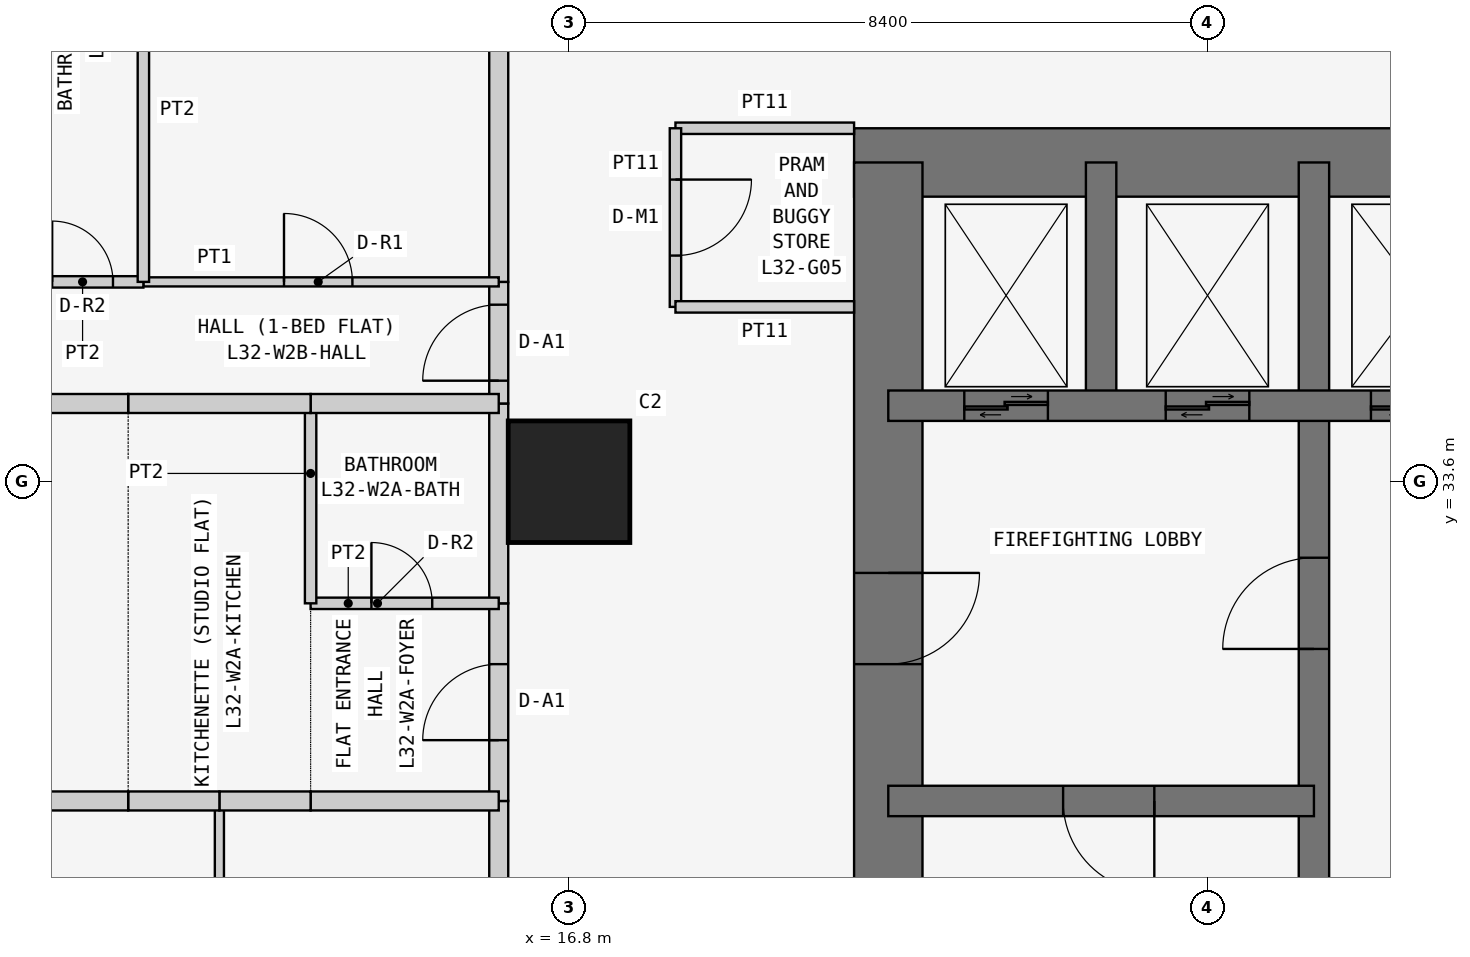
"""IFC4 building model, lengths in metres.
Left out: names, types, materials, properties, quantities, classifications, styles, units other than length and angle.
Written with IfcOpenShell. Run it as: python <this file> out.ifc"""

import sys

from ifc_helpers import new_model, si_unit, direction, frame, frame_2d, origin, origin_2d, place, context, subcontext, project, spatial, rectangle, extrude, element, fill, save


model = new_model("IFC4")
c1 = context("Model", 3, precision=1e-05, world=origin(), true_north=direction((0.0, 1.0)))
c2 = subcontext(c1, "Body", "Model", "MODEL_VIEW")
j1 = project(units=[si_unit("LENGTHUNIT", "METRE"), si_unit("PLANEANGLEUNIT", "RADIAN")], contexts=[c1])
p1 = place(None, origin())
s1 = spatial("IfcSite", under=j1, at=p1, CompositionType="ELEMENT")
p2 = place(p1, origin())
s2 = spatial("IfcBuilding", under=s1, at=p2, CompositionType="ELEMENT")
p3 = place(p2, frame((0.0, 0.0, 126.9)))
s3 = spatial("IfcBuildingStorey", under=s2, at=p3, CompositionType="ELEMENT", Elevation=126.9)
p4 = place(p3, frame((16.8, 33.6, 0.0), z_axis=(0.0, 0.0, 1.0), x_axis=(1.0, 0.0, 0.0)))
e1 = element("IfcColumn", 1, at=p4, inside=s3, PredefinedType="COLUMN", context=c2, shape_type="SweptSolid", body=[
    extrude(rectangle(XDim=1.6, YDim=1.6, at=origin_2d()), origin(), (0.0, 0.0, 1.0), 3.6),
])
p5 = place(p3, frame((37.8, 37.8, 0.0), z_axis=(0.0, 0.0, 1.0), x_axis=(-1.0, 0.0, 0.0)))
e2 = element("IfcWall", 2, at=p5, inside=s3, PredefinedType="SHEAR", context=c2, shape_type="SweptSolid", body=[
    extrude(rectangle(XDim=17.25, YDim=0.9, at=frame_2d((8.625, 0.0))), origin(), (0.0, 0.0, 1.0), 3.6),
])
p6 = place(p3, frame((21.0, 37.8, 0.0), z_axis=(0.0, 0.0, 1.0), x_axis=(0.0, -1.0, 0.0)))
e3 = element("IfcWall", 3, at=p6, inside=s3, PredefinedType="SHEAR", context=c2, shape_type="SweptSolid", body=[
    extrude(rectangle(XDim=17.25, YDim=0.9, at=frame_2d((8.625, 0.0))), origin(), (0.0, 0.0, 1.0), 3.6),
])
p7 = place(p6, frame((5.4, 0.0, 0.0)))
e4 = element("IfcOpeningElement", 4, at=p7, cuts=e3, PredefinedType="OPENING", context=c2, shape_type="SweptSolid", body=[
    extrude(rectangle(XDim=1.2, YDim=2.1, at=frame_2d((0.6, 1.05))), frame((0.0, 0.46, 0.0), z_axis=(0.0, -1.0, 0.0), x_axis=(1.0, 0.0, 0.0)), (0.0, 0.0, 1.0), 0.92),
])
p8 = place(p3, frame((26.6, 21.0, 0.0), z_axis=(0.0, 0.0, 1.0), x_axis=(0.0, 1.0, 0.0)))
e5 = element("IfcWall", 5, at=p8, inside=s3, PredefinedType="SHEAR", context=c2, shape_type="SweptSolid", body=[
    extrude(rectangle(XDim=16.8, YDim=0.4, at=frame_2d((8.4, 0.0))), origin(), (0.0, 0.0, 1.0), 3.6),
])
p9 = place(p8, frame((10.4, 0.0, 0.0)))
e6 = element("IfcOpeningElement", 6, at=p9, cuts=e5, PredefinedType="OPENING", context=c2, shape_type="SweptSolid", body=[
    extrude(rectangle(XDim=1.2, YDim=2.1, at=frame_2d((0.6, 1.05))), frame((0.0, 0.21, 0.0), z_axis=(0.0, -1.0, 0.0), x_axis=(1.0, 0.0, 0.0)), (0.0, 0.0, 1.0), 0.42),
])
p10 = place(p3, frame((21.0, 29.4, 0.0), z_axis=(0.0, 0.0, 1.0), x_axis=(1.0, 0.0, 0.0)))
e7 = element("IfcWall", 7, at=p10, inside=s3, PredefinedType="SHEAR", context=c2, shape_type="SweptSolid", body=[
    extrude(rectangle(XDim=5.6, YDim=0.4, at=frame_2d((2.8, 0.0))), origin(), (0.0, 0.0, 1.0), 3.6),
])
p11 = place(p10, frame((2.3, 0.0, 0.0)))
e8 = element("IfcOpeningElement", 8, at=p11, cuts=e7, PredefinedType="OPENING", context=c2, shape_type="SweptSolid", body=[
    extrude(rectangle(XDim=1.2, YDim=2.1, at=frame_2d((0.6, 1.05))), frame((0.0, 0.21, 0.0), z_axis=(0.0, -1.0, 0.0), x_axis=(1.0, 0.0, 0.0)), (0.0, 0.0, 1.0), 0.42),
])
p12 = place(p3, frame((21.0, 34.6, 0.0), z_axis=(0.0, 0.0, 1.0), x_axis=(1.0, 0.0, 0.0)))
e9 = element("IfcWall", 9, at=p12, inside=s3, PredefinedType="SHEAR", context=c2, shape_type="SweptSolid", body=[
    extrude(rectangle(XDim=11.2, YDim=0.4, at=frame_2d((5.6, 0.0))), origin(), (0.0, 0.0, 1.0), 3.6),
])
p13 = place(p12, frame((9.35, 0.0, 0.0)))
e10 = element("IfcOpeningElement", 10, at=p13, cuts=e9, PredefinedType="OPENING", context=c2, shape_type="SweptSolid", body=[
    extrude(rectangle(XDim=0.9, YDim=2.1, at=frame_2d((0.45, 1.05))), frame((0.0, 0.21, 0.0), z_axis=(0.0, -1.0, 0.0), x_axis=(1.0, 0.0, 0.0)), (0.0, 0.0, 1.0), 0.42),
])
p14 = place(p12, frame((1.0, 0.0, 0.0)))
e11 = element("IfcOpeningElement", 11, at=p14, cuts=e9, PredefinedType="OPENING", context=c2, shape_type="SweptSolid", body=[
    extrude(rectangle(XDim=1.1, YDim=2.1, at=frame_2d((0.55, 1.05))), frame((0.0, 0.21, 0.0), z_axis=(0.0, -1.0, 0.0), x_axis=(1.0, 0.0, 0.0)), (0.0, 0.0, 1.0), 0.42),
])
p15 = place(p12, frame((3.65, 0.0, 0.0)))
e12 = element("IfcOpeningElement", 12, at=p15, cuts=e9, PredefinedType="OPENING", context=c2, shape_type="SweptSolid", body=[
    extrude(rectangle(XDim=1.1, YDim=2.1, at=frame_2d((0.55, 1.05))), frame((0.0, 0.21, 0.0), z_axis=(0.0, -1.0, 0.0), x_axis=(1.0, 0.0, 0.0)), (0.0, 0.0, 1.0), 0.42),
])
p16 = place(p12, frame((6.35, 0.0, 0.0)))
e13 = element("IfcOpeningElement", 13, at=p16, cuts=e9, PredefinedType="OPENING", context=c2, shape_type="SweptSolid", body=[
    extrude(rectangle(XDim=1.3, YDim=2.1, at=frame_2d((0.65, 1.05))), frame((0.0, 0.21, 0.0), z_axis=(0.0, -1.0, 0.0), x_axis=(1.0, 0.0, 0.0)), (0.0, 0.0, 1.0), 0.42),
])
p17 = place(p3, frame((23.8, 34.6, 0.0), z_axis=(0.0, 0.0, 1.0), x_axis=(0.0, 1.0, 0.0)))
e14 = element("IfcWall", 14, at=p17, inside=s3, PredefinedType="SHEAR", context=c2, shape_type="SweptSolid", body=[
    extrude(rectangle(XDim=3.2, YDim=0.4, at=frame_2d((1.6, 0.0))), origin(), (0.0, 0.0, 1.0), 3.6),
])
p18 = place(p3, frame((20.55, 38.25, 0.0), z_axis=(0.0, 0.0, 1.0), x_axis=(-1.0, 0.0, 0.0)))
e15 = element("IfcWall", 15, at=p18, inside=s3, PredefinedType="PARTITIONING", context=c2, shape_type="SweptSolid", body=[
    extrude(rectangle(XDim=2.35, YDim=0.15, at=frame_2d((1.175, 0.0))), origin(), (0.0, 0.0, 1.0), 3.45),
])
p19 = place(p3, frame((18.2, 38.25, 0.0), z_axis=(0.0, 0.0, 1.0), x_axis=(0.0, -1.0, 0.0)))
e16 = element("IfcWall", 16, at=p19, inside=s3, PredefinedType="PARTITIONING", context=c2, shape_type="SweptSolid", body=[
    extrude(rectangle(XDim=2.35, YDim=0.15, at=frame_2d((1.175, 0.0))), origin(), (0.0, 0.0, 1.0), 3.45),
])
p20 = place(p19, frame((0.675, 0.0, 0.0)))
e17 = element("IfcOpeningElement", 17, at=p20, cuts=e16, PredefinedType="OPENING", context=c2, shape_type="SweptSolid", body=[
    extrude(rectangle(XDim=1.0, YDim=2.1, at=frame_2d((0.5, 1.05))), frame((0.0, 0.085, 0.0), z_axis=(0.0, -1.0, 0.0), x_axis=(1.0, 0.0, 0.0)), (0.0, 0.0, 1.0), 0.17),
])
p21 = place(p3, frame((18.2, 35.9, 0.0), z_axis=(0.0, 0.0, 1.0), x_axis=(1.0, 0.0, 0.0)))
e18 = element("IfcWall", 18, at=p21, inside=s3, PredefinedType="PARTITIONING", context=c2, shape_type="SweptSolid", body=[
    extrude(rectangle(XDim=2.35, YDim=0.15, at=frame_2d((1.175, 0.0))), origin(), (0.0, 0.0, 1.0), 3.45),
])
p22 = place(p3, frame((15.875, 24.171, 0.0), z_axis=(0.0, 0.0, 1.0), x_axis=(0.0, 1.0, 0.0)))
e19 = element("IfcWall", 19, at=p22, inside=s3, PredefinedType="PARTITIONING", context=c2, shape_type="SweptSolid", body=[
    extrude(rectangle(XDim=5.229, YDim=0.25, at=frame_2d((2.615, 0.0))), origin(), (0.0, 0.0, 1.0), 3.45),
])
p23 = place(p22, frame((2.129, 0.0, 0.0)))
e20 = element("IfcOpeningElement", 20, at=p23, cuts=e19, PredefinedType="OPENING", context=c2, shape_type="SweptSolid", body=[
    extrude(rectangle(XDim=1.0, YDim=2.1, at=frame_2d((0.5, 1.05))), frame((0.0, 0.135, 0.0), z_axis=(0.0, -1.0, 0.0), x_axis=(1.0, 0.0, 0.0)), (0.0, 0.0, 1.0), 0.27),
])
p24 = place(p3, frame((15.875, 29.4, 0.0), z_axis=(0.0, 0.0, 1.0), x_axis=(0.0, 1.0, 0.0)))
e21 = element("IfcWall", 21, at=p24, inside=s3, PredefinedType="PARTITIONING", context=c2, shape_type="SweptSolid", body=[
    extrude(rectangle(XDim=2.6, YDim=0.25, at=frame_2d((1.3, 0.0))), origin(), (0.0, 0.0, 1.0), 3.45),
])
p25 = place(p24, frame((0.8, 0.0, 0.0)))
e22 = element("IfcOpeningElement", 22, at=p25, cuts=e21, PredefinedType="OPENING", context=c2, shape_type="SweptSolid", body=[
    extrude(rectangle(XDim=1.0, YDim=2.1, at=frame_2d((0.5, 1.05))), frame((0.0, 0.135, 0.0), z_axis=(0.0, -1.0, 0.0), x_axis=(1.0, 0.0, 0.0)), (0.0, 0.0, 1.0), 0.27),
])
p26 = place(p3, frame((15.875, 32.0, 0.0), z_axis=(0.0, 0.0, 1.0), x_axis=(0.0, 1.0, 0.0)))
e23 = element("IfcWall", 23, at=p26, inside=s3, PredefinedType="PARTITIONING", context=c2, shape_type="SweptSolid", body=[
    extrude(rectangle(XDim=2.629, YDim=0.25, at=frame_2d((1.314, 0.0))), origin(), (0.0, 0.0, 1.0), 3.45),
])
p27 = place(p3, frame((15.875, 34.629, 0.0), z_axis=(0.0, 0.0, 1.0), x_axis=(0.0, 1.0, 0.0)))
e24 = element("IfcWall", 24, at=p27, inside=s3, PredefinedType="PARTITIONING", context=c2, shape_type="SweptSolid", body=[
    extrude(rectangle(XDim=1.6, YDim=0.25, at=frame_2d((0.8, 0.0))), origin(), (0.0, 0.0, 1.0), 3.45),
])
p28 = place(p27, frame((0.3, 0.0, 0.0)))
e25 = element("IfcOpeningElement", 25, at=p28, cuts=e24, PredefinedType="OPENING", context=c2, shape_type="SweptSolid", body=[
    extrude(rectangle(XDim=1.0, YDim=2.1, at=frame_2d((0.5, 1.05))), frame((0.0, 0.135, 0.0), z_axis=(0.0, -1.0, 0.0), x_axis=(1.0, 0.0, 0.0)), (0.0, 0.0, 1.0), 0.27),
])
p29 = place(p3, frame((15.875, 36.229, 0.0), z_axis=(0.0, 0.0, 1.0), x_axis=(0.0, 1.0, 0.0)))
e26 = element("IfcWall", 26, at=p29, inside=s3, PredefinedType="PARTITIONING", context=c2, shape_type="SweptSolid", body=[
    extrude(rectangle(XDim=6.471, YDim=0.25, at=frame_2d((3.235, 0.0))), origin(), (0.0, 0.0, 1.0), 3.45),
])
p30 = place(p3, frame((12.2, 29.4, 0.0), z_axis=(0.0, 0.0, 1.0), x_axis=(0.0, -1.0, 0.0)))
e27 = element("IfcWall", 27, at=p30, inside=s3, PredefinedType="PARTITIONING", context=c2, shape_type="SweptSolid", body=[
    extrude(rectangle(XDim=5.229, YDim=0.12, at=frame_2d((2.615, 0.0))), origin(), (0.0, 0.0, 1.0), 3.45),
])
p31 = place(p3, frame((15.875, 29.4, 0.0), z_axis=(0.0, 0.0, 1.0), x_axis=(-1.0, 0.0, 0.0)))
e28 = element("IfcWall", 28, at=p31, inside=s3, PredefinedType="PARTITIONING", context=c2, shape_type="SweptSolid", body=[
    extrude(rectangle(XDim=2.475, YDim=0.25, at=frame_2d((1.238, 0.0))), origin(), (0.0, 0.0, 1.0), 3.45),
])
for number, where, z_axis, x_axis in (
    (29, (13.4, 29.4, 0.0), (0.0, 0.0, 1.0), (-1.0, 0.0, 0.0)),
    (30, (12.2, 29.4, 0.0), (0.0, 0.0, 1.0), (-1.0, 0.0, 0.0)),
    (31, (11.0, 29.4, 0.0), (0.0, 0.0, 1.0), (-1.0, 0.0, 0.0)),
):
    element("IfcWall", number, at=place(p3, frame(where, z_axis=z_axis, x_axis=x_axis)), inside=s3, PredefinedType="PARTITIONING", context=c2, shape_type="SweptSolid", body=[
        extrude(rectangle(XDim=1.2, YDim=0.25, at=frame_2d((0.6, 0.0))), origin(), (0.0, 0.0, 1.0), 3.45),
    ])
p32 = place(p3, frame((13.4, 32.0, 0.0), z_axis=(0.0, 0.0, 1.0), x_axis=(1.0, 0.0, 0.0)))
e32 = element("IfcWall", 32, at=p32, inside=s3, PredefinedType="PARTITIONING", context=c2, shape_type="SweptSolid", body=[
    extrude(rectangle(XDim=2.475, YDim=0.15, at=frame_2d((1.238, 0.0))), origin(), (0.0, 0.0, 1.0), 3.45),
])
p33 = place(p32, frame((0.8, 0.0, 0.0)))
e33 = element("IfcOpeningElement", 33, at=p33, cuts=e32, PredefinedType="OPENING", context=c2, shape_type="SweptSolid", body=[
    extrude(rectangle(XDim=0.8, YDim=2.1, at=frame_2d((0.4, 1.05))), frame((0.0, 0.085, 0.0), z_axis=(0.0, -1.0, 0.0), x_axis=(1.0, 0.0, 0.0)), (0.0, 0.0, 1.0), 0.17),
])
p34 = place(p3, frame((13.4, 32.0, 0.0), z_axis=(0.0, 0.0, 1.0), x_axis=(0.0, 1.0, 0.0)))
e34 = element("IfcWall", 34, at=p34, inside=s3, PredefinedType="PARTITIONING", context=c2, shape_type="SweptSolid", body=[
    extrude(rectangle(XDim=2.629, YDim=0.15, at=frame_2d((1.314, 0.0))), origin(), (0.0, 0.0, 1.0), 3.45),
])
p35 = place(p3, frame((13.4, 34.629, 0.0), z_axis=(0.0, 0.0, 1.0), x_axis=(1.0, 0.0, 0.0)))
e35 = element("IfcWall", 35, at=p35, inside=s3, PredefinedType="PARTITIONING", context=c2, shape_type="SweptSolid", body=[
    extrude(rectangle(XDim=2.475, YDim=0.25, at=frame_2d((1.238, 0.0))), origin(), (0.0, 0.0, 1.0), 3.45),
])
p36 = place(p3, frame((11.0, 34.629, 0.0), z_axis=(0.0, 0.0, 1.0), x_axis=(1.0, 0.0, 0.0)))
e36 = element("IfcWall", 36, at=p36, inside=s3, PredefinedType="PARTITIONING", context=c2, shape_type="SweptSolid", body=[
    extrude(rectangle(XDim=2.4, YDim=0.25, at=frame_2d((1.2, 0.0))), origin(), (0.0, 0.0, 1.0), 3.45),
])
p37 = place(p3, frame((3.5, 34.629, 0.0), z_axis=(0.0, 0.0, 1.0), x_axis=(1.0, 0.0, 0.0)))
e37 = element("IfcWall", 37, at=p37, inside=s3, PredefinedType="PARTITIONING", context=c2, shape_type="SweptSolid", body=[
    extrude(rectangle(XDim=7.5, YDim=0.25, at=frame_2d((3.75, 0.0))), origin(), (0.0, 0.0, 1.0), 3.45),
])
p38 = place(p3, frame((11.2, 36.229, 0.0), z_axis=(0.0, 0.0, 1.0), x_axis=(1.0, 0.0, 0.0)))
e38 = element("IfcWall", 38, at=p38, inside=s3, PredefinedType="PARTITIONING", context=c2, shape_type="SweptSolid", body=[
    extrude(rectangle(XDim=4.675, YDim=0.12, at=frame_2d((2.337, 0.0))), origin(), (0.0, 0.0, 1.0), 3.45),
])
p39 = place(p38, frame((1.85, 0.0, 0.0)))
e39 = element("IfcOpeningElement", 39, at=p39, cuts=e38, PredefinedType="OPENING", context=c2, shape_type="SweptSolid", body=[
    extrude(rectangle(XDim=0.9, YDim=2.1, at=frame_2d((0.45, 1.05))), frame((0.0, 0.07, 0.0), z_axis=(0.0, -1.0, 0.0), x_axis=(1.0, 0.0, 0.0)), (0.0, 0.0, 1.0), 0.14),
])
p40 = place(p3, frame((9.6, 36.229, 0.0), z_axis=(0.0, 0.0, 1.0), x_axis=(1.0, 0.0, 0.0)))
e40 = element("IfcWall", 40, at=p40, inside=s3, PredefinedType="PARTITIONING", context=c2, shape_type="SweptSolid", body=[
    extrude(rectangle(XDim=1.6, YDim=0.15, at=frame_2d((0.8, 0.0))), origin(), (0.0, 0.0, 1.0), 3.45),
])
p41 = place(p40, frame((0.4, 0.0, 0.0)))
e41 = element("IfcOpeningElement", 41, at=p41, cuts=e40, PredefinedType="OPENING", context=c2, shape_type="SweptSolid", body=[
    extrude(rectangle(XDim=0.8, YDim=2.1, at=frame_2d((0.4, 1.05))), frame((0.0, 0.085, 0.0), z_axis=(0.0, -1.0, 0.0), x_axis=(1.0, 0.0, 0.0)), (0.0, 0.0, 1.0), 0.17),
])
p42 = place(p3, frame((11.2, 36.229, 0.0), z_axis=(0.0, 0.0, 1.0), x_axis=(0.0, 1.0, 0.0)))
e42 = element("IfcWall", 42, at=p42, inside=s3, PredefinedType="PARTITIONING", context=c2, shape_type="SweptSolid", body=[
    extrude(rectangle(XDim=6.471, YDim=0.15, at=frame_2d((3.235, 0.0))), origin(), (0.0, 0.0, 1.0), 3.45),
])
p43 = place(p20, origin())
e43 = element("IfcDoor", 43, at=p43, inside=s3, OperationType="SINGLE_SWING_LEFT", PredefinedType="DOOR", context=c2, shape_type="SweptSolid", body=[
    extrude(rectangle(XDim=1.0, YDim=2.1, at=frame_2d((0.5, 1.05))), frame((0.0, 0.025, 0.0), z_axis=(0.0, -1.0, 0.0), x_axis=(1.0, 0.0, 0.0)), (0.0, 0.0, 1.0), 0.05),
])
fill(e17, e43)
p44 = place(p25, origin())
e44 = element("IfcDoor", 44, at=p44, inside=s3, OperationType="SINGLE_SWING_LEFT", PredefinedType="DOOR", context=c2, shape_type="SweptSolid", body=[
    extrude(rectangle(XDim=1.0, YDim=2.1, at=frame_2d((0.5, 1.05))), frame((0.0, 0.025, 0.0), z_axis=(0.0, -1.0, 0.0), x_axis=(1.0, 0.0, 0.0)), (0.0, 0.0, 1.0), 0.05),
])
fill(e22, e44)
p45 = place(p33, origin())
e45 = element("IfcDoor", 45, at=p45, inside=s3, OperationType="SINGLE_SWING_LEFT", PredefinedType="DOOR", context=c2, shape_type="SweptSolid", body=[
    extrude(rectangle(XDim=0.8, YDim=2.1, at=frame_2d((0.4, 1.05))), frame((0.0, 0.025, 0.0), z_axis=(0.0, -1.0, 0.0), x_axis=(1.0, 0.0, 0.0)), (0.0, 0.0, 1.0), 0.05),
])
fill(e33, e45)
p46 = place(p28, origin())
e46 = element("IfcDoor", 46, at=p46, inside=s3, OperationType="SINGLE_SWING_LEFT", PredefinedType="DOOR", context=c2, shape_type="SweptSolid", body=[
    extrude(rectangle(XDim=1.0, YDim=2.1, at=frame_2d((0.5, 1.05))), frame((0.0, 0.025, 0.0), z_axis=(0.0, -1.0, 0.0), x_axis=(1.0, 0.0, 0.0)), (0.0, 0.0, 1.0), 0.05),
])
fill(e25, e46)
p47 = place(p39, origin())
e47 = element("IfcDoor", 47, at=p47, inside=s3, OperationType="SINGLE_SWING_LEFT", PredefinedType="DOOR", context=c2, shape_type="SweptSolid", body=[
    extrude(rectangle(XDim=0.9, YDim=2.1, at=frame_2d((0.45, 1.05))), frame((0.0, 0.025, 0.0), z_axis=(0.0, -1.0, 0.0), x_axis=(1.0, 0.0, 0.0)), (0.0, 0.0, 1.0), 0.05),
])
fill(e39, e47)
p48 = place(p41, origin())
e48 = element("IfcDoor", 48, at=p48, inside=s3, OperationType="SINGLE_SWING_LEFT", PredefinedType="DOOR", context=c2, shape_type="SweptSolid", body=[
    extrude(rectangle(XDim=0.8, YDim=2.1, at=frame_2d((0.4, 1.05))), frame((0.0, 0.025, 0.0), z_axis=(0.0, -1.0, 0.0), x_axis=(1.0, 0.0, 0.0)), (0.0, 0.0, 1.0), 0.05),
])
fill(e41, e48)
p49 = place(p7, origin())
e49 = element("IfcDoor", 49, at=p49, inside=s3, OperationType="SINGLE_SWING_LEFT", PredefinedType="DOOR", context=c2, shape_type="SweptSolid", body=[
    extrude(rectangle(XDim=1.2, YDim=2.1, at=frame_2d((0.6, 1.05))), frame((0.0, 0.025, 0.0), z_axis=(0.0, -1.0, 0.0), x_axis=(1.0, 0.0, 0.0)), (0.0, 0.0, 1.0), 0.05),
])
fill(e4, e49)
p50 = place(p11, frame((1.2, 0.0, 0.0), z_axis=(0.0, 0.0, 1.0), x_axis=(-1.0, 0.0, 0.0)))
e50 = element("IfcDoor", 50, at=p50, inside=s3, OperationType="SINGLE_SWING_LEFT", PredefinedType="DOOR", context=c2, shape_type="SweptSolid", body=[
    extrude(rectangle(XDim=1.2, YDim=2.1, at=frame_2d((0.6, 1.05))), frame((0.0, 0.025, 0.0), z_axis=(0.0, -1.0, 0.0), x_axis=(1.0, 0.0, 0.0)), (0.0, 0.0, 1.0), 0.05),
])
fill(e8, e50)
p51 = place(p9, origin())
e51 = element("IfcDoor", 51, at=p51, inside=s3, OperationType="SINGLE_SWING_LEFT", PredefinedType="DOOR", context=c2, shape_type="SweptSolid", body=[
    extrude(rectangle(XDim=1.2, YDim=2.1, at=frame_2d((0.6, 1.05))), frame((0.0, 0.025, 0.0), z_axis=(0.0, -1.0, 0.0), x_axis=(1.0, 0.0, 0.0)), (0.0, 0.0, 1.0), 0.05),
])
fill(e6, e51)
p52 = place(p14, origin())
e52 = element("IfcDoor", 52, at=p52, inside=s3, OperationType="DOUBLE_DOOR_SLIDING", PredefinedType="DOOR", context=c2, shape_type="SweptSolid", body=[
    extrude(rectangle(XDim=1.1, YDim=2.1, at=frame_2d((0.55, 1.05))), frame((0.0, 0.025, 0.0), z_axis=(0.0, -1.0, 0.0), x_axis=(1.0, 0.0, 0.0)), (0.0, 0.0, 1.0), 0.05),
])
fill(e11, e52)
p53 = place(p15, origin())
e53 = element("IfcDoor", 53, at=p53, inside=s3, OperationType="DOUBLE_DOOR_SLIDING", PredefinedType="DOOR", context=c2, shape_type="SweptSolid", body=[
    extrude(rectangle(XDim=1.1, YDim=2.1, at=frame_2d((0.55, 1.05))), frame((0.0, 0.025, 0.0), z_axis=(0.0, -1.0, 0.0), x_axis=(1.0, 0.0, 0.0)), (0.0, 0.0, 1.0), 0.05),
])
fill(e12, e53)
p54 = place(p16, origin())
e54 = element("IfcDoor", 54, at=p54, inside=s3, OperationType="DOUBLE_DOOR_SLIDING", PredefinedType="DOOR", context=c2, shape_type="SweptSolid", body=[
    extrude(rectangle(XDim=1.3, YDim=2.1, at=frame_2d((0.65, 1.05))), frame((0.0, 0.025, 0.0), z_axis=(0.0, -1.0, 0.0), x_axis=(1.0, 0.0, 0.0)), (0.0, 0.0, 1.0), 0.05),
])
fill(e13, e54)
save(model, sys.argv[1])
